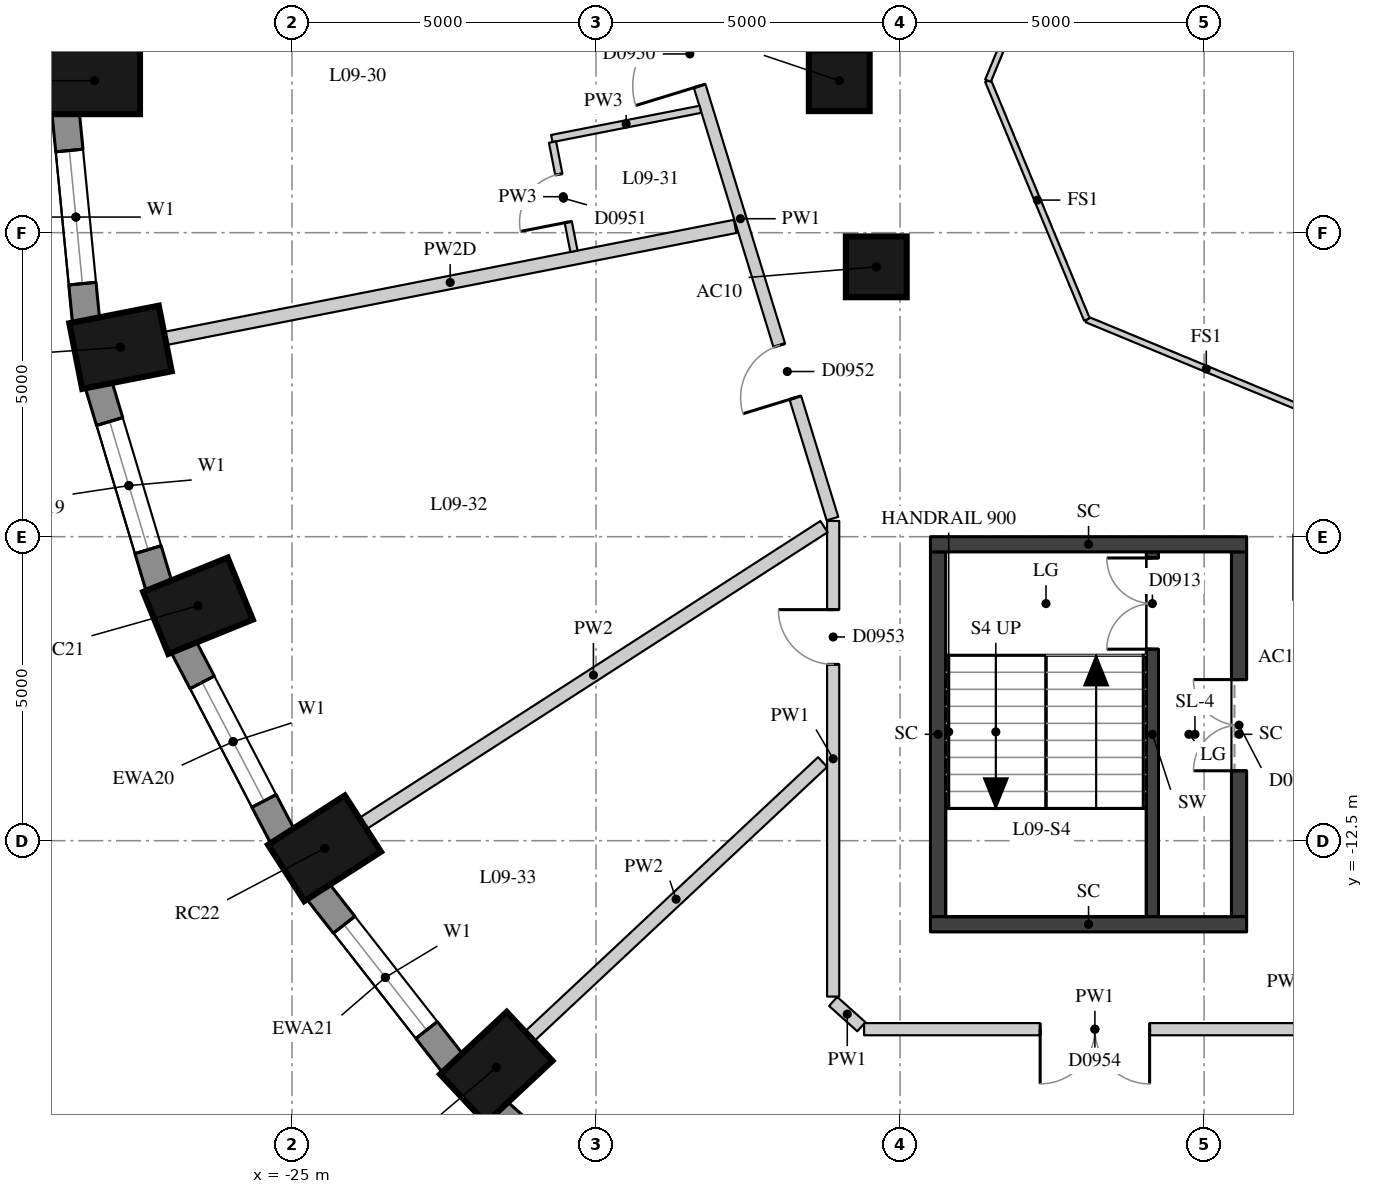
"""IFC4 building model, lengths in metres.
Left out: names, types, materials, properties, quantities, classifications, styles, units other than length and angle.
Written with IfcOpenShell. Run it as: python <this file> out.ifc"""

import sys

from ifc_helpers import new_model, si_unit, direction, frame, frame_2d, origin, origin_2d, place, context, subcontext, project, spatial, rectangle, extrude, element, fill, save


model = new_model("IFC4")
c1 = context("Model", 3, precision=1e-05, world=origin(), true_north=direction((0.0, 1.0)))
c2 = subcontext(c1, "Body", "Model", "MODEL_VIEW")
j1 = project(units=[si_unit("LENGTHUNIT", "METRE"), si_unit("PLANEANGLEUNIT", "RADIAN")], contexts=[c1])
p1 = place(None, origin())
s1 = spatial("IfcSite", under=j1, at=p1, CompositionType="ELEMENT")
p2 = place(p1, origin())
s2 = spatial("IfcBuilding", under=s1, at=p2, CompositionType="ELEMENT")
p3 = place(p2, frame((0.0, 0.0, 38.2)))
s3 = spatial("IfcBuildingStorey", under=s2, at=p3, CompositionType="ELEMENT", Elevation=38.2)
for number, where, z_axis, x_axis in (
    (1, (-28.25, 0.0, 0.0), (0.0, 0.0, 1.0), (-1.0, 0.0, 0.0)),
    (2, (-27.821, -4.385, 0.0), (0.0, 0.0, 1.0), (-0.981, -0.193, 0.0)),
    (3, (-26.546, -8.636, 0.0), (0.0, 0.0, 1.0), (-0.927, -0.376, 0.0)),
    (4, (-24.465, -12.625, 0.0), (0.0, 0.0, 1.0), (-0.841, -0.541, 0.0)),
    (5, (-21.641, -16.23, 0.0), (0.0, 0.0, 1.0), (-0.73, -0.683, 0.0)),
):
    element("IfcColumn", number, at=place(p3, frame(where, z_axis=z_axis, x_axis=x_axis)), inside=s3, PredefinedType="COLUMN", context=c2, shape_type="SweptSolid", body=[
        extrude(rectangle(XDim=1.5, YDim=1.1, at=origin_2d()), origin(), (0.0, 0.0, 1.0), 3.3),
    ])
for number, where, z_axis, x_axis in (
    (6, (-16.0, 0.0, 0.0), (0.0, 0.0, 1.0), (1.0, 0.0, 0.0)),
    (7, (-15.391, -3.062, 0.0), (0.0, 0.0, 1.0), (1.0, 0.0, 0.0)),
):
    element("IfcColumn", number, at=place(p3, frame(where, z_axis=z_axis, x_axis=x_axis)), inside=s3, PredefinedType="COLUMN", context=c2, shape_type="SweptSolid", body=[
        extrude(rectangle(XDim=1.0, YDim=1.0, at=origin_2d()), origin(), (0.0, 0.0, 1.0), 3.3),
    ])
p4 = place(p3, frame((-28.722, -0.53, 0.0), z_axis=(0.0, 0.0, 1.0), x_axis=(0.097389581596, -0.995246336038, 0.0)))
e8 = element("IfcWall", 8, at=p4, inside=s3, PredefinedType="SOLIDWALL", context=c2, shape_type="SweptSolid", body=[
    extrude(rectangle(XDim=3.442, YDim=0.45, at=frame_2d((1.721, 0.0))), origin(), (0.0, 0.0, 1.0), 3.02),
])
p5 = place(p4, frame((0.621, 0.0, 0.4)))
e9 = element("IfcOpeningElement", 9, at=p5, cuts=e8, PredefinedType="OPENING", context=c2, shape_type="SweptSolid", body=[
    extrude(rectangle(XDim=2.2, YDim=1.75, at=frame_2d((1.1, 0.875))), frame((0.0, 0.235, 0.0), z_axis=(0.0, -1.0, 0.0), x_axis=(1.0, 0.0, 0.0)), (0.0, 0.0, 1.0), 0.47),
])
p6 = place(p3, frame((-28.182, -4.996, 0.0), z_axis=(0.0, 0.0, 1.0), x_axis=(0.287064133733, -0.957911364963, 0.0)))
e10 = element("IfcWall", 10, at=p6, inside=s3, PredefinedType="SOLIDWALL", context=c2, shape_type="SweptSolid", body=[
    extrude(rectangle(XDim=3.473, YDim=0.45, at=frame_2d((1.737, 0.0))), origin(), (0.0, 0.0, 1.0), 3.02),
])
p7 = place(p6, frame((0.637, 0.0, 0.4)))
e11 = element("IfcOpeningElement", 11, at=p7, cuts=e10, PredefinedType="OPENING", context=c2, shape_type="SweptSolid", body=[
    extrude(rectangle(XDim=2.2, YDim=1.75, at=frame_2d((1.1, 0.875))), frame((0.0, 0.235, 0.0), z_axis=(0.0, -1.0, 0.0), x_axis=(1.0, 0.0, 0.0)), (0.0, 0.0, 1.0), 0.47),
])
p8 = place(p3, frame((-26.786, -9.305, 0.0), z_axis=(0.0, 0.0, 1.0), x_axis=(0.462492775226, -0.886623050041, 0.0)))
e12 = element("IfcWall", 12, at=p8, inside=s3, PredefinedType="SOLIDWALL", context=c2, shape_type="SweptSolid", body=[
    extrude(rectangle(XDim=3.532, YDim=0.45, at=frame_2d((1.766, 0.0))), origin(), (0.0, 0.0, 1.0), 3.02),
])
p9 = place(p8, frame((0.666, 0.0, 0.4)))
e13 = element("IfcOpeningElement", 13, at=p9, cuts=e12, PredefinedType="OPENING", context=c2, shape_type="SweptSolid", body=[
    extrude(rectangle(XDim=2.2, YDim=1.75, at=frame_2d((1.1, 0.875))), frame((0.0, 0.235, 0.0), z_axis=(0.0, -1.0, 0.0), x_axis=(1.0, 0.0, 0.0)), (0.0, 0.0, 1.0), 0.47),
])
p10 = place(p3, frame((-24.578, -13.328, 0.0), z_axis=(0.0, 0.0, 1.0), x_axis=(0.616661975264, -0.787228053529, 0.0)))
e14 = element("IfcWall", 14, at=p10, inside=s3, PredefinedType="SOLIDWALL", context=c2, shape_type="SweptSolid", body=[
    extrude(rectangle(XDim=3.61, YDim=0.45, at=frame_2d((1.805, 0.0))), origin(), (0.0, 0.0, 1.0), 3.02),
])
p11 = place(p10, frame((0.705, 0.0, 0.4)))
e15 = element("IfcOpeningElement", 15, at=p11, cuts=e14, PredefinedType="OPENING", context=c2, shape_type="SweptSolid", body=[
    extrude(rectangle(XDim=2.2, YDim=1.75, at=frame_2d((1.1, 0.875))), frame((0.0, 0.235, 0.0), z_axis=(0.0, -1.0, 0.0), x_axis=(1.0, 0.0, 0.0)), (0.0, 0.0, 1.0), 0.47),
])
p12 = place(p3, frame((-21.627, -16.943, 0.0), z_axis=(0.0, 0.0, 1.0), x_axis=(0.745526233716, -0.66647628228, 0.0)))
e16 = element("IfcWall", 16, at=p12, inside=s3, PredefinedType="SOLIDWALL", context=c2, shape_type="SweptSolid", body=[
    extrude(rectangle(XDim=3.697, YDim=0.45, at=frame_2d((1.848, 0.0))), origin(), (0.0, 0.0, 1.0), 3.02),
])
p13 = place(p12, frame((0.749, 0.0, 0.4)))
e17 = element("IfcOpeningElement", 17, at=p13, cuts=e16, PredefinedType="OPENING", context=c2, shape_type="SweptSolid", body=[
    extrude(rectangle(XDim=2.2, YDim=1.75, at=frame_2d((1.1, 0.875))), frame((0.0, 0.235, 0.0), z_axis=(0.0, -1.0, 0.0), x_axis=(1.0, 0.0, 0.0)), (0.0, 0.0, 1.0), 0.47),
])
p14 = place(p3, frame((-10.85, -13.75, 0.0), z_axis=(0.0, 0.0, 1.0), x_axis=(0.0, 1.0, 0.0)))
e18 = element("IfcWall", 18, at=p14, inside=s3, PredefinedType="SHEAR", context=c2, shape_type="SweptSolid", body=[
    extrude(rectangle(XDim=6.0, YDim=0.2, at=frame_2d((3.0, 0.0))), origin(), (0.0, 0.0, 1.0), 3.02),
])
p15 = place(p14, frame((4.4, 0.0, 0.0)))
e19 = element("IfcOpeningElement", 19, at=p15, cuts=e18, PredefinedType="OPENING", context=c2, shape_type="SweptSolid", body=[
    extrude(rectangle(XDim=1.5, YDim=2.1, at=frame_2d((0.75, 1.05))), frame((0.0, 0.11, 0.0), z_axis=(0.0, -1.0, 0.0), x_axis=(1.0, 0.0, 0.0)), (0.0, 0.0, 1.0), 0.22),
])
p16 = place(p3, frame((-14.375, -13.75, -0.28), z_axis=(0.0, 0.0, 1.0), x_axis=(0.0, 1.0, 0.0)))
e20 = element("IfcWall", 20, at=p16, inside=s3, PredefinedType="SHEAR", context=c2, shape_type="SweptSolid", body=[
    extrude(rectangle(XDim=6.0, YDim=0.25, at=frame_2d((3.0, 0.0))), origin(), (0.0, 0.0, 1.0), 3.3),
])
p17 = place(p3, frame((-9.425, -13.75, -0.28), z_axis=(0.0, 0.0, 1.0), x_axis=(0.0, 1.0, 0.0)))
e21 = element("IfcWall", 21, at=p17, inside=s3, PredefinedType="SHEAR", context=c2, shape_type="SweptSolid", body=[
    extrude(rectangle(XDim=6.0, YDim=0.25, at=frame_2d((3.0, 0.0))), origin(), (0.0, 0.0, 1.0), 3.3),
])
p18 = place(p17, frame((2.4, 0.0, 0.28)))
e22 = element("IfcOpeningElement", 22, at=p18, cuts=e21, PredefinedType="OPENING", context=c2, shape_type="SweptSolid", body=[
    extrude(rectangle(XDim=1.5, YDim=2.1, at=frame_2d((0.75, 1.05))), frame((0.0, 0.135, 0.0), z_axis=(0.0, -1.0, 0.0), x_axis=(1.0, 0.0, 0.0)), (0.0, 0.0, 1.0), 0.27),
])
for number, where, z_axis, x_axis in (
    (23, (-14.5, -7.625, -0.28), (0.0, 0.0, 1.0), (1.0, 0.0, 0.0)),
    (24, (-14.5, -13.875, -0.28), (0.0, 0.0, 1.0), (1.0, 0.0, 0.0)),
):
    element("IfcWall", number, at=place(p3, frame(where, z_axis=z_axis, x_axis=x_axis)), inside=s3, PredefinedType="SHEAR", context=c2, shape_type="SweptSolid", body=[
        extrude(rectangle(XDim=5.2, YDim=0.25, at=frame_2d((2.6, 0.0))), origin(), (0.0, 0.0, 1.0), 3.3),
    ])
p19 = place(p3, frame((-8.0, -15.6, 0.0), z_axis=(0.0, 0.0, 1.0), x_axis=(-1.0, 0.0, 0.0)))
e25 = element("IfcWall", 25, at=p19, inside=s3, PredefinedType="PARTITIONING", context=c2, shape_type="SweptSolid", body=[
    extrude(rectangle(XDim=7.592, YDim=0.2, at=frame_2d((3.796, 0.0))), origin(), (0.0, 0.0, 1.0), 3.02),
])
p20 = place(p19, frame((2.896, 0.0, 0.0)))
e26 = element("IfcOpeningElement", 26, at=p20, cuts=e25, PredefinedType="OPENING", context=c2, shape_type="SweptSolid", body=[
    extrude(rectangle(XDim=1.8, YDim=2.1, at=frame_2d((0.9, 1.05))), frame((0.0, 0.11, 0.0), z_axis=(0.0, -1.0, 0.0), x_axis=(1.0, 0.0, 0.0)), (0.0, 0.0, 1.0), 0.22),
])
p21 = place(p3, frame((-15.636, -15.56, 0.0), z_axis=(0.0, 0.0, 1.0), x_axis=(-0.744656758283, 0.667447610187, 0.0)))
e27 = element("IfcWall", 27, at=p21, inside=s3, PredefinedType="PARTITIONING", context=c2, shape_type="SweptSolid", body=[
    extrude(rectangle(XDim=0.623, YDim=0.2, at=frame_2d((0.312, 0.0))), origin(), (0.0, 0.0, 1.0), 3.02),
])
p22 = place(p3, frame((-16.1, -15.064, 0.0), z_axis=(0.0, 0.0, 1.0), x_axis=(0.0, 1.0, 0.0)))
e28 = element("IfcWall", 28, at=p22, inside=s3, PredefinedType="PARTITIONING", context=c2, shape_type="SweptSolid", body=[
    extrude(rectangle(XDim=7.823, YDim=0.2, at=frame_2d((3.912, 0.0))), origin(), (0.0, 0.0, 1.0), 3.02),
])
p23 = place(p22, frame((5.464, 0.0, 0.0)))
e29 = element("IfcOpeningElement", 29, at=p23, cuts=e28, PredefinedType="OPENING", context=c2, shape_type="SweptSolid", body=[
    extrude(rectangle(XDim=0.9, YDim=2.1, at=frame_2d((0.45, 1.05))), frame((0.0, 0.11, 0.0), z_axis=(0.0, -1.0, 0.0), x_axis=(1.0, 0.0, 0.0)), (0.0, 0.0, 1.0), 0.22),
])
p24 = place(p3, frame((-16.112, -7.203, 0.0), z_axis=(0.0, 0.0, 1.0), x_axis=(-0.293439067289, 0.95597777892, 0.0)))
e30 = element("IfcWall", 30, at=p24, inside=s3, PredefinedType="PARTITIONING", context=c2, shape_type="SweptSolid", body=[
    extrude(rectangle(XDim=10.319, YDim=0.2, at=frame_2d((5.16, 0.0))), origin(), (0.0, 0.0, 1.0), 3.02),
])
p25 = place(p24, frame((7.444, 0.0, 0.0)))
e31 = element("IfcOpeningElement", 31, at=p25, cuts=e30, PredefinedType="OPENING", context=c2, shape_type="SweptSolid", body=[
    extrude(rectangle(XDim=1.1, YDim=2.1, at=frame_2d((0.55, 1.05))), frame((0.0, 0.11, 0.0), z_axis=(0.0, -1.0, 0.0), x_axis=(1.0, 0.0, 0.0)), (0.0, 0.0, 1.0), 0.22),
])
p26 = place(p24, frame((2.081, 0.0, 0.0)))
e32 = element("IfcOpeningElement", 32, at=p26, cuts=e30, PredefinedType="OPENING", context=c2, shape_type="SweptSolid", body=[
    extrude(rectangle(XDim=0.9, YDim=2.1, at=frame_2d((0.45, 1.05))), frame((0.0, 0.11, 0.0), z_axis=(0.0, -1.0, 0.0), x_axis=(1.0, 0.0, 0.0)), (0.0, 0.0, 1.0), 0.22),
])
p27 = place(p3, frame((-27.085, -4.24, 0.0), z_axis=(0.0, 0.0, 1.0), x_axis=(0.981199931552, 0.192994026651, 0.0)))
e33 = element("IfcWall", 33, at=p27, inside=s3, PredefinedType="PARTITIONING", context=c2, shape_type="SweptSolid", body=[
    extrude(rectangle(XDim=9.552, YDim=0.22, at=frame_2d((4.776, 0.0))), origin(), (0.0, 0.0, 1.0), 2.47),
])
p28 = place(p3, frame((-23.835, -12.219, 0.0), z_axis=(0.0, 0.0, 1.0), x_axis=(0.840731477632, 0.541452290159, 0.0)))
e34 = element("IfcWall", 34, at=p28, inside=s3, PredefinedType="PARTITIONING", context=c2, shape_type="SweptSolid", body=[
    extrude(rectangle(XDim=9.021, YDim=0.22, at=frame_2d((4.51, 0.0))), origin(), (0.0, 0.0, 1.0), 3.02),
])
p29 = place(p3, frame((-21.093, -15.718, 0.0), z_axis=(0.0, 0.0, 1.0), x_axis=(0.73009284205, 0.683347965525, 0.0)))
e35 = element("IfcWall", 35, at=p29, inside=s3, PredefinedType="PARTITIONING", context=c2, shape_type="SweptSolid", body=[
    extrude(rectangle(XDim=6.602, YDim=0.22, at=frame_2d((3.301, 0.0))), origin(), (0.0, 0.0, 1.0), 3.02),
])
p30 = place(p3, frame((-9.429, -23.014, 0.0), z_axis=(0.0, 0.0, 1.0), x_axis=(0.310242805557, 0.950657352362, 0.0)))
e36 = element("IfcWall", 36, at=p30, inside=s3, PredefinedType="PARTITIONING", context=c2, shape_type="SweptSolid", body=[
    extrude(rectangle(XDim=8.808, YDim=0.22, at=frame_2d((4.404, 0.0))), origin(), (0.0, 0.0, 1.0), 3.02),
])
p31 = place(p3, frame((-18.283, -0.47, 0.0), z_axis=(0.0, 0.0, 1.0), x_axis=(-0.981208753495, -0.192949169643, 0.0)))
e37 = element("IfcWall", 37, at=p31, inside=s3, PredefinedType="PARTITIONING", context=c2, shape_type="SweptSolid", body=[
    extrude(rectangle(XDim=2.491, YDim=0.12, at=frame_2d((1.246, 0.0))), origin(), (0.0, 0.0, 1.0), 3.02),
])
p32 = place(p3, frame((-20.716, -1.01, 0.0), z_axis=(0.0, 0.0, 1.0), x_axis=(0.193036598643, -0.981191557029, 0.0)))
e38 = element("IfcWall", 38, at=p32, inside=s3, PredefinedType="PARTITIONING", context=c2, shape_type="SweptSolid", body=[
    extrude(rectangle(XDim=1.83, YDim=0.12, at=frame_2d((0.915, 0.0))), origin(), (0.0, 0.0, 1.0), 3.02),
])
p33 = place(p32, frame((0.54, 0.0, 0.0)))
e39 = element("IfcOpeningElement", 39, at=p33, cuts=e38, PredefinedType="OPENING", context=c2, shape_type="SweptSolid", body=[
    extrude(rectangle(XDim=0.8, YDim=2.1, at=frame_2d((0.4, 1.05))), frame((0.0, 0.07, 0.0), z_axis=(0.0, -1.0, 0.0), x_axis=(1.0, 0.0, 0.0)), (0.0, 0.0, 1.0), 0.14),
])
for number, where, z_axis, x_axis in (
    (40, (-8.0, -5.554, 0.0), (0.0, 0.0, 1.0), (-0.924, 0.383, 0.0)),
    (41, (-11.927, -3.927, 0.0), (0.0, 0.0, 1.0), (-0.383, 0.924, 0.0)),
    (42, (-13.554, 0.0, 0.0), (0.0, 0.0, 1.0), (0.383, 0.924, 0.0)),
):
    element("IfcWall", number, at=place(p3, frame(where, z_axis=z_axis, x_axis=x_axis)), inside=s3, PredefinedType="PARTITIONING", context=c2, shape_type="SweptSolid", body=[
        extrude(rectangle(XDim=4.251, YDim=0.1, at=frame_2d((2.125, 0.0))), origin(), (0.0, 0.0, 1.0), 3.02),
    ])
p34 = place(p5, origin())
e43 = element("IfcWindow", 43, at=p34, inside=s3, PartitioningType="SINGLE_PANEL", PredefinedType="WINDOW", context=c2, shape_type="SweptSolid", body=[
    extrude(rectangle(XDim=2.2, YDim=1.75, at=frame_2d((1.1, 0.875))), frame((0.0, 0.035, 0.0), z_axis=(0.0, -1.0, 0.0), x_axis=(1.0, 0.0, 0.0)), (0.0, 0.0, 1.0), 0.06),
])
fill(e9, e43)
p35 = place(p7, origin())
e44 = element("IfcWindow", 44, at=p35, inside=s3, PartitioningType="SINGLE_PANEL", PredefinedType="WINDOW", context=c2, shape_type="SweptSolid", body=[
    extrude(rectangle(XDim=2.2, YDim=1.75, at=frame_2d((1.1, 0.875))), frame((0.0, 0.035, 0.0), z_axis=(0.0, -1.0, 0.0), x_axis=(1.0, 0.0, 0.0)), (0.0, 0.0, 1.0), 0.06),
])
fill(e11, e44)
p36 = place(p9, origin())
e45 = element("IfcWindow", 45, at=p36, inside=s3, PartitioningType="SINGLE_PANEL", PredefinedType="WINDOW", context=c2, shape_type="SweptSolid", body=[
    extrude(rectangle(XDim=2.2, YDim=1.75, at=frame_2d((1.1, 0.875))), frame((0.0, 0.035, 0.0), z_axis=(0.0, -1.0, 0.0), x_axis=(1.0, 0.0, 0.0)), (0.0, 0.0, 1.0), 0.06),
])
fill(e13, e45)
p37 = place(p11, origin())
e46 = element("IfcWindow", 46, at=p37, inside=s3, PartitioningType="SINGLE_PANEL", PredefinedType="WINDOW", context=c2, shape_type="SweptSolid", body=[
    extrude(rectangle(XDim=2.2, YDim=1.75, at=frame_2d((1.1, 0.875))), frame((0.0, 0.035, 0.0), z_axis=(0.0, -1.0, 0.0), x_axis=(1.0, 0.0, 0.0)), (0.0, 0.0, 1.0), 0.06),
])
fill(e15, e46)
p38 = place(p15, origin())
e47 = element("IfcDoor", 47, at=p38, inside=s3, OperationType="DOUBLE_DOOR_SINGLE_SWING", PredefinedType="DOOR", context=c2, shape_type="SweptSolid", body=[
    extrude(rectangle(XDim=1.5, YDim=2.1, at=frame_2d((0.75, 1.05))), frame((0.0, 0.025, 0.0), z_axis=(0.0, -1.0, 0.0), x_axis=(1.0, 0.0, 0.0)), (0.0, 0.0, 1.0), 0.05),
])
fill(e19, e47)
p39 = place(p18, origin())
e48 = element("IfcDoor", 48, at=p39, inside=s3, OperationType="DOUBLE_DOOR_SINGLE_SWING", PredefinedType="DOOR", context=c2, shape_type="SweptSolid", body=[
    extrude(rectangle(XDim=1.5, YDim=2.1, at=frame_2d((0.75, 1.05))), frame((0.0, 0.025, 0.0), z_axis=(0.0, -1.0, 0.0), x_axis=(1.0, 0.0, 0.0)), (0.0, 0.0, 1.0), 0.05),
])
fill(e22, e48)
p40 = place(p25, origin())
e49 = element("IfcDoor", 49, at=p40, inside=s3, OperationType="SINGLE_SWING_LEFT", PredefinedType="DOOR", context=c2, shape_type="SweptSolid", body=[
    extrude(rectangle(XDim=1.1, YDim=2.1, at=frame_2d((0.55, 1.05))), frame((0.0, 0.025, 0.0), z_axis=(0.0, -1.0, 0.0), x_axis=(1.0, 0.0, 0.0)), (0.0, 0.0, 1.0), 0.05),
])
fill(e31, e49)
p41 = place(p33, origin())
e50 = element("IfcDoor", 50, at=p41, inside=s3, OperationType="SINGLE_SWING_LEFT", PredefinedType="DOOR", context=c2, shape_type="SweptSolid", body=[
    extrude(rectangle(XDim=0.8, YDim=2.1, at=frame_2d((0.4, 1.05))), frame((0.0, 0.025, 0.0), z_axis=(0.0, -1.0, 0.0), x_axis=(1.0, 0.0, 0.0)), (0.0, 0.0, 1.0), 0.05),
])
fill(e39, e50)
p42 = place(p26, origin())
e51 = element("IfcDoor", 51, at=p42, inside=s3, OperationType="SINGLE_SWING_LEFT", PredefinedType="DOOR", context=c2, shape_type="SweptSolid", body=[
    extrude(rectangle(XDim=0.9, YDim=2.1, at=frame_2d((0.45, 1.05))), frame((0.0, 0.025, 0.0), z_axis=(0.0, -1.0, 0.0), x_axis=(1.0, 0.0, 0.0)), (0.0, 0.0, 1.0), 0.05),
])
fill(e32, e51)
p43 = place(p23, origin())
e52 = element("IfcDoor", 52, at=p43, inside=s3, OperationType="SINGLE_SWING_RIGHT", PredefinedType="DOOR", context=c2, shape_type="SweptSolid", body=[
    extrude(rectangle(XDim=0.9, YDim=2.1, at=frame_2d((0.45, 1.05))), frame((0.0, 0.025, 0.0), z_axis=(0.0, -1.0, 0.0), x_axis=(1.0, 0.0, 0.0)), (0.0, 0.0, 1.0), 0.05),
])
fill(e29, e52)
p44 = place(p20, origin())
e53 = element("IfcDoor", 53, at=p44, inside=s3, OperationType="DOUBLE_DOOR_SINGLE_SWING", PredefinedType="DOOR", context=c2, shape_type="SweptSolid", body=[
    extrude(rectangle(XDim=1.8, YDim=2.1, at=frame_2d((0.9, 1.05))), frame((0.0, 0.025, 0.0), z_axis=(0.0, -1.0, 0.0), x_axis=(1.0, 0.0, 0.0)), (0.0, 0.0, 1.0), 0.05),
])
fill(e26, e53)
save(model, sys.argv[1])
